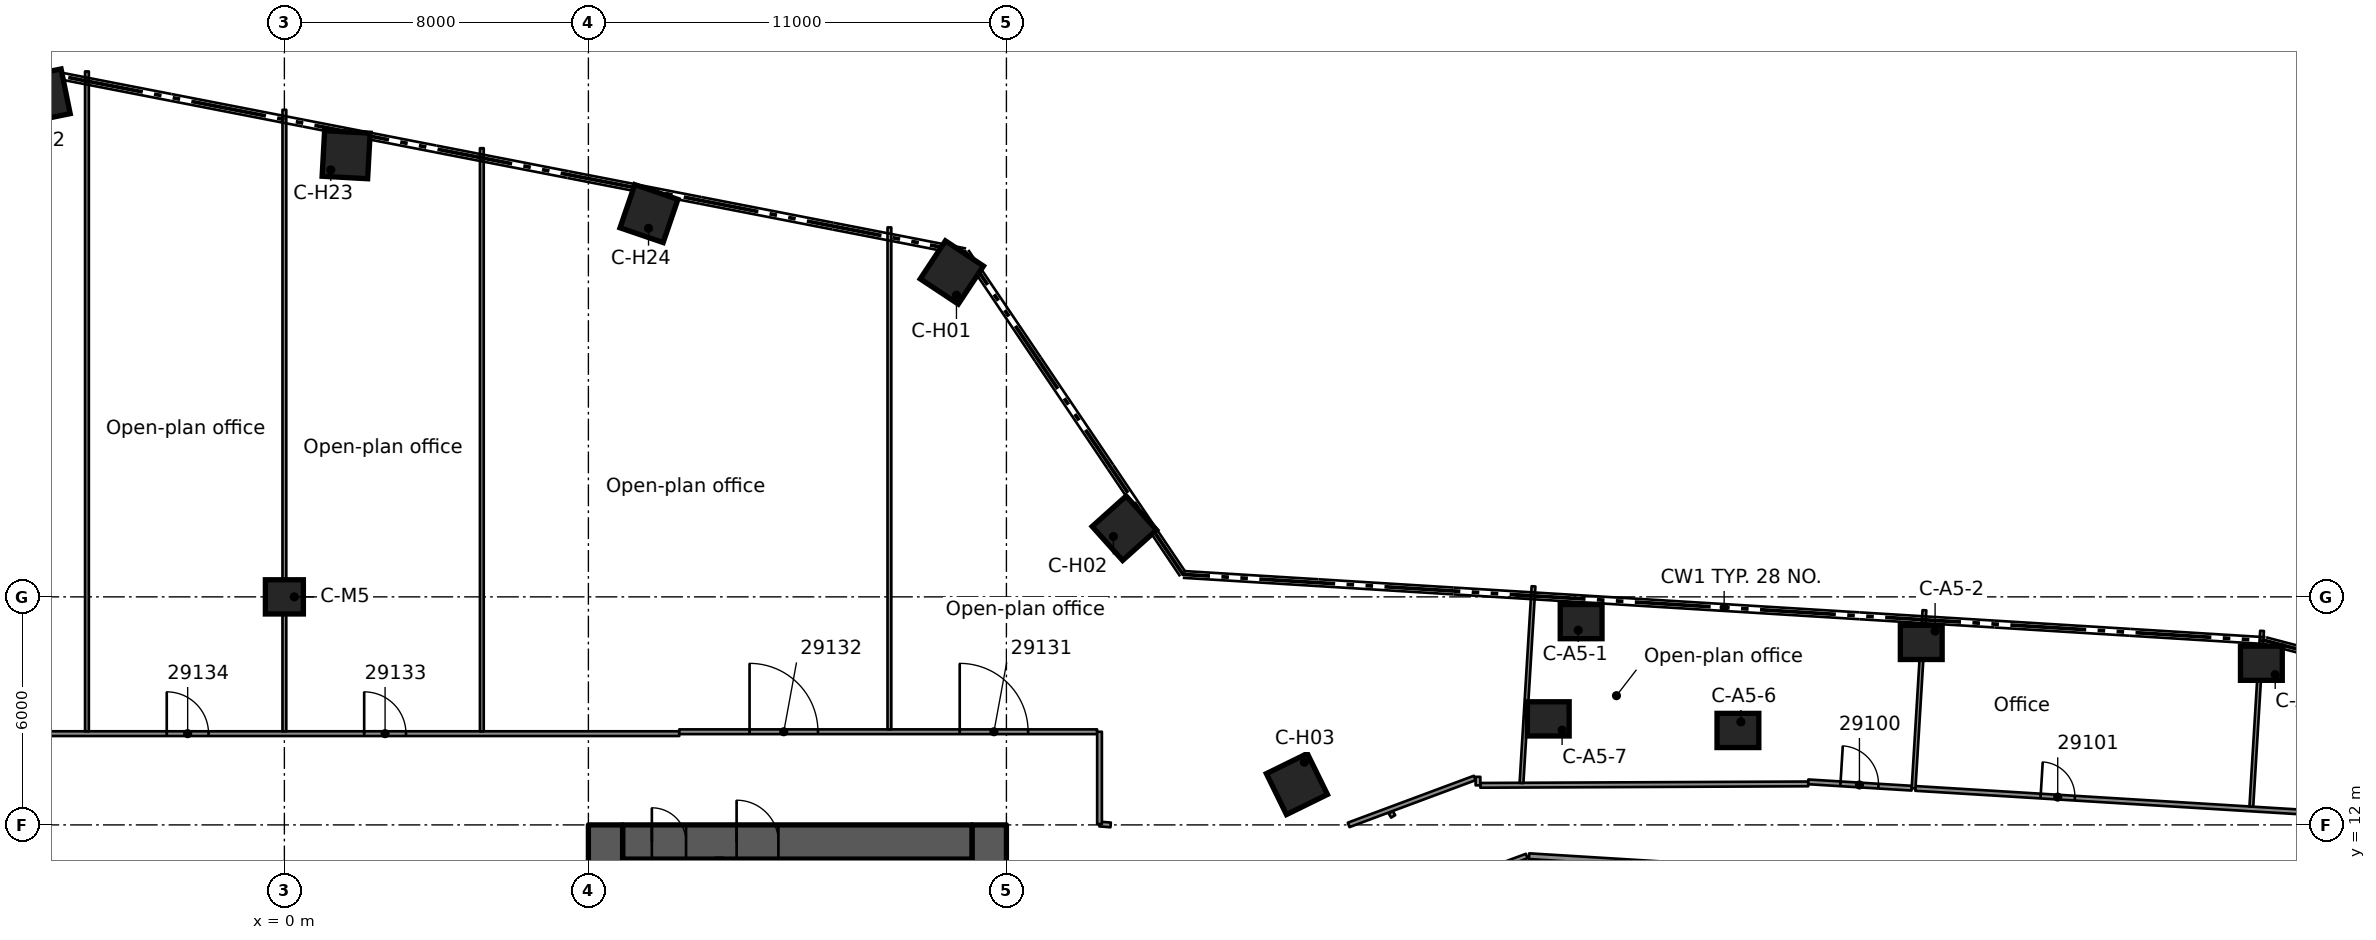
"""IFC4 building model, lengths in metres.
Left out: names, types, materials, properties, quantities, classifications, styles, units other than length and angle.
Written with IfcOpenShell. Run it as: python <this file> out.ifc"""

import sys

from ifc_helpers import new_model, si_unit, direction, frame, frame_2d, origin, origin_2d, place, context, subcontext, project, spatial, rectangle, extrude, element, fill, save


model = new_model("IFC4")
c1 = context("Model", 3, precision=1e-05, world=origin(), true_north=direction((0.0, 1.0)))
c2 = subcontext(c1, "Body", "Model", "MODEL_VIEW")
j1 = project(units=[si_unit("LENGTHUNIT", "METRE"), si_unit("PLANEANGLEUNIT", "RADIAN")], contexts=[c1])
p1 = place(None, origin())
s1 = spatial("IfcSite", under=j1, at=p1, CompositionType="ELEMENT")
p2 = place(p1, origin())
s2 = spatial("IfcBuilding", under=s1, at=p2, CompositionType="ELEMENT")
p3 = place(p2, frame((0.0, 0.0, 149.1)))
s3 = spatial("IfcBuildingStorey", under=s2, at=p3, CompositionType="ELEMENT", Elevation=149.1)
p4 = place(p3, frame((8.9, 11.55, 0.0), z_axis=(0.0, 0.0, 1.0), x_axis=(1.0, 0.0, 0.0)))
e1 = element("IfcWall", 1, at=p4, inside=s3, PredefinedType="SHEAR", context=c2, shape_type="SweptSolid", body=[
    extrude(rectangle(XDim=9.2, YDim=0.9, at=frame_2d((4.6, 0.0))), origin(), (0.0, 0.0, 1.0), 3.5),
])
p5 = place(p4, frame((3.0, 0.0, 0.0)))
e2 = element("IfcOpeningElement", 2, at=p5, cuts=e1, PredefinedType="OPENING", context=c2, shape_type="SweptSolid", body=[
    extrude(rectangle(XDim=1.1, YDim=2.1, at=frame_2d((0.55, 1.05))), frame((0.0, 0.46, 0.0), z_axis=(0.0, -1.0, 0.0), x_axis=(1.0, 0.0, 0.0)), (0.0, 0.0, 1.0), 0.92),
])
p6 = place(p4, frame((0.77, 0.0, 0.0)))
e3 = element("IfcOpeningElement", 3, at=p6, cuts=e1, PredefinedType="OPENING", context=c2, shape_type="SweptSolid", body=[
    extrude(rectangle(XDim=0.9, YDim=2.1, at=frame_2d((0.45, 1.05))), frame((0.0, 0.46, 0.0), z_axis=(0.0, -1.0, 0.0), x_axis=(1.0, 0.0, 0.0)), (0.0, 0.0, 1.0), 0.92),
])
p7 = place(p3, frame((8.45, -12.0, 0.0), z_axis=(0.0, 0.0, 1.0), x_axis=(0.0, 1.0, 0.0)))
e4 = element("IfcWall", 4, at=p7, inside=s3, PredefinedType="SHEAR", context=c2, shape_type="SweptSolid", body=[
    extrude(rectangle(XDim=24.0, YDim=0.9, at=frame_2d((12.0, 0.0))), origin(), (0.0, 0.0, 1.0), 3.5),
])
p8 = place(p7, frame((12.6, 0.0, 0.0)))
e5 = element("IfcOpeningElement", 5, at=p8, cuts=e4, PredefinedType="OPENING", context=c2, shape_type="SweptSolid", body=[
    extrude(rectangle(XDim=1.8, YDim=2.1, at=frame_2d((0.9, 1.05))), frame((0.0, 0.46, 0.0), z_axis=(0.0, -1.0, 0.0), x_axis=(1.0, 0.0, 0.0)), (0.0, 0.0, 1.0), 0.92),
])
p9 = place(p7, frame((3.25, 0.0, 0.0)))
e6 = element("IfcOpeningElement", 6, at=p9, cuts=e4, PredefinedType="OPENING", context=c2, shape_type="SweptSolid", body=[
    extrude(rectangle(XDim=1.1, YDim=2.1, at=frame_2d((0.55, 1.05))), frame((0.0, 0.46, 0.0), z_axis=(0.0, -1.0, 0.0), x_axis=(1.0, 0.0, 0.0)), (0.0, 0.0, 1.0), 0.92),
])
p10 = place(p3, frame((18.55, -12.0, 0.0), z_axis=(0.0, 0.0, 1.0), x_axis=(0.0, 1.0, 0.0)))
e7 = element("IfcWall", 7, at=p10, inside=s3, PredefinedType="SHEAR", context=c2, shape_type="SweptSolid", body=[
    extrude(rectangle(XDim=24.0, YDim=0.9, at=frame_2d((12.0, 0.0))), origin(), (0.0, 0.0, 1.0), 3.5),
])
p11 = place(p10, frame((12.1, 0.0, 0.0)))
e8 = element("IfcOpeningElement", 8, at=p11, cuts=e7, PredefinedType="OPENING", context=c2, shape_type="SweptSolid", body=[
    extrude(rectangle(XDim=1.8, YDim=2.1, at=frame_2d((0.9, 1.05))), frame((0.0, 0.46, 0.0), z_axis=(0.0, -1.0, 0.0), x_axis=(1.0, 0.0, 0.0)), (0.0, 0.0, 1.0), 0.92),
])
for number, where, z_axis, x_axis in (
    (9, (34.123, 17.349, 0.0), (0.0, 0.0, 1.0), (1.0, 0.0, 0.0)),
    (10, (43.073, 16.802, 0.0), (0.0, 0.0, 1.0), (1.0, 0.0, 0.0)),
    (11, (52.023, 16.254, 0.0), (0.0, 0.0, 1.0), (1.0, 0.0, 0.0)),
    (12, (38.249, 14.485, 0.0), (0.0, 0.0, 1.0), (1.0, 0.0, 0.0)),
    (13, (33.258, 14.79, 0.0), (0.0, 0.0, 1.0), (1.0, 0.0, 0.0)),
):
    element("IfcColumn", number, at=place(p3, frame(where, z_axis=z_axis, x_axis=x_axis)), inside=s3, PredefinedType="COLUMN", context=c2, shape_type="SweptSolid", body=[
        extrude(rectangle(XDim=1.1, YDim=0.9, at=origin_2d()), origin(), (0.0, 0.0, 1.0), 3.5),
    ])
for number, where, z_axis, x_axis in (
    (14, (17.564, 26.536, 0.0), (0.0, 0.0, 1.0), (0.552, 0.834, 0.0)),
    (15, (22.104, 19.806, 0.0), (0.0, 0.0, 1.0), (0.745, 0.667, 0.0)),
    (16, (26.644, 13.075, 0.0), (0.0, 0.0, 1.0), (0.898, 0.441, 0.0)),
    (17, (-6.344, 31.183, 0.0), (0.0, 0.0, 1.0), (-0.199, 0.98, 0.0)),
    (18, (1.625, 29.634, 0.0), (0.0, 0.0, 1.0), (0.055, 0.998, 0.0)),
    (19, (9.594, 28.085, 0.0), (0.0, 0.0, 1.0), (0.323, 0.946, 0.0)),
):
    element("IfcColumn", number, at=place(p3, frame(where, z_axis=z_axis, x_axis=x_axis)), inside=s3, PredefinedType="COLUMN", context=c2, shape_type="SweptSolid", body=[
        extrude(rectangle(XDim=1.2, YDim=1.2, at=origin_2d()), origin(), (0.0, 0.0, 1.0), 3.5),
    ])
p12 = place(p3, frame((0.0, 18.0, 0.0), z_axis=(0.0, 0.0, 1.0), x_axis=(1.0, 0.0, 0.0)))
e20 = element("IfcColumn", 20, at=p12, inside=s3, PredefinedType="COLUMN", context=c2, shape_type="SweptSolid", body=[
    extrude(rectangle(XDim=1.0, YDim=0.9, at=origin_2d()), origin(), (0.0, 0.0, 1.0), 3.5),
])
p13 = place(p3, frame((11.44, 11.1, 0.0), z_axis=(0.0, 0.0, 1.0), x_axis=(0.0, -1.0, 0.0)))
e21 = element("IfcWall", 21, at=p13, inside=s3, PredefinedType="SOLIDWALL", context=c2, shape_type="SweptSolid", body=[
    extrude(rectangle(XDim=4.125, YDim=0.2, at=frame_2d((2.062, 0.0))), origin(), (0.0, 0.0, 1.0), 3.09),
])
p14 = place(p3, frame((29.112, 12.332, 0.0), z_axis=(0.0, 0.0, 1.0), x_axis=(0.515635582666, -0.856807998264, 0.0)))
e22 = element("IfcWall", 22, at=p14, inside=s3, PredefinedType="PARTITIONING", context=c2, shape_type="SweptSolid", body=[
    extrude(rectangle(XDim=0.126, YDim=0.125, at=frame_2d((0.063, 0.0))), origin(), (0.0, 0.0, 1.0), 3.08),
])
p15 = place(p3, frame((21.45, 12.023, 0.0), z_axis=(0.0, 0.0, 1.0), x_axis=(0.996945992079, -0.078094102713, 0.0)))
e23 = element("IfcWall", 23, at=p15, inside=s3, PredefinedType="PARTITIONING", context=c2, shape_type="SweptSolid", body=[
    extrude(rectangle(XDim=0.294, YDim=0.125, at=frame_2d((0.147, 0.0))), origin(), (0.0, 0.0, 1.0), 3.08),
])
p16 = place(p3, frame((44.16, 10.478, 0.0), z_axis=(0.0, 0.0, 1.0), x_axis=(-0.998127894331, 0.061161315872, 0.0)))
e24 = element("IfcWall", 24, at=p16, inside=s3, PredefinedType="PARTITIONING", context=c2, shape_type="SweptSolid", body=[
    extrude(rectangle(XDim=11.428, YDim=0.15, at=frame_2d((5.714, 0.0))), origin(), (0.0, 0.0, 1.0), 3.08),
])
p17 = place(p16, frame((3.538, 0.0, 0.0)))
e25 = element("IfcOpeningElement", 25, at=p17, cuts=e24, PredefinedType="OPENING", context=c2, shape_type="SweptSolid", body=[
    extrude(rectangle(XDim=0.9, YDim=2.1, at=frame_2d((0.45, 1.05))), frame((0.0, 0.085, 0.0), z_axis=(0.0, -1.0, 0.0), x_axis=(1.0, 0.0, 0.0)), (0.0, 0.0, 1.0), 0.17),
])
p18 = place(p3, frame((42.921, 12.96, 0.0), z_axis=(0.0, 0.0, 1.0), x_axis=(0.998135679052, -0.061034139647, 0.0)))
e26 = element("IfcWall", 26, at=p18, inside=s3, PredefinedType="PARTITIONING", context=c2, shape_type="SweptSolid", body=[
    extrude(rectangle(XDim=13.468, YDim=0.125, at=frame_2d((6.734, 0.0))), origin(), (0.0, 0.0, 1.0), 3.08),
])
p19 = place(p18, frame((3.3, 0.0, 0.0)))
e27 = element("IfcOpeningElement", 27, at=p19, cuts=e26, PredefinedType="OPENING", context=c2, shape_type="SweptSolid", body=[
    extrude(rectangle(XDim=0.9, YDim=2.1, at=frame_2d((0.45, 1.05))), frame((0.0, 0.073, 0.0), z_axis=(0.0, -1.0, 0.0), x_axis=(1.0, 0.0, 0.0)), (0.0, 0.0, 1.0), 0.145),
])
p20 = place(p3, frame((40.099, 13.133, 0.0), z_axis=(0.0, 0.0, 1.0), x_axis=(0.998123336101, -0.061235658973, 0.0)))
e28 = element("IfcWall", 28, at=p20, inside=s3, PredefinedType="PARTITIONING", context=c2, shape_type="SweptSolid", body=[
    extrude(rectangle(XDim=2.727, YDim=0.125, at=frame_2d((1.364, 0.0))), origin(), (0.0, 0.0, 1.0), 3.08),
])
p21 = place(p20, frame((0.85, 0.0, 0.0)))
e29 = element("IfcOpeningElement", 29, at=p21, cuts=e28, PredefinedType="OPENING", context=c2, shape_type="SweptSolid", body=[
    extrude(rectangle(XDim=1.0, YDim=2.1, at=frame_2d((0.5, 1.05))), frame((0.0, 0.073, 0.0), z_axis=(0.0, -1.0, 0.0), x_axis=(1.0, 0.0, 0.0)), (0.0, 0.0, 1.0), 0.145),
])
p22 = place(p3, frame((31.471, 13.041, 0.0), z_axis=(0.0, 0.0, 1.0), x_axis=(0.999990255084, 0.004414718129, 0.0)))
e30 = element("IfcWall", 30, at=p22, inside=s3, PredefinedType="PARTITIONING", context=c2, shape_type="SweptSolid", body=[
    extrude(rectangle(XDim=8.627, YDim=0.125, at=frame_2d((4.313, 0.0))), origin(), (0.0, 0.0, 1.0), 3.08),
])
p23 = place(p3, frame((-10.39, 14.401, 0.0), z_axis=(0.0, 0.0, 1.0), x_axis=(1.0, 0.0, 0.0)))
e31 = element("IfcWall", 31, at=p23, inside=s3, PredefinedType="PARTITIONING", context=c2, shape_type="SweptSolid", body=[
    extrude(rectangle(XDim=20.781, YDim=0.125, at=frame_2d((10.391, 0.0))), origin(), (0.0, 0.0, 1.0), 3.08),
])
p24 = place(p23, frame((12.49, 0.0, 0.0)))
e32 = element("IfcOpeningElement", 32, at=p24, cuts=e31, PredefinedType="OPENING", context=c2, shape_type="SweptSolid", body=[
    extrude(rectangle(XDim=1.1, YDim=2.1, at=frame_2d((0.55, 1.05))), frame((0.0, 0.073, 0.0), z_axis=(0.0, -1.0, 0.0), x_axis=(1.0, 0.0, 0.0)), (0.0, 0.0, 1.0), 0.145),
])
p25 = place(p23, frame((7.295, 0.0, 0.0)))
e33 = element("IfcOpeningElement", 33, at=p25, cuts=e31, PredefinedType="OPENING", context=c2, shape_type="SweptSolid", body=[
    extrude(rectangle(XDim=1.1, YDim=2.1, at=frame_2d((0.55, 1.05))), frame((0.0, 0.073, 0.0), z_axis=(0.0, -1.0, 0.0), x_axis=(1.0, 0.0, 0.0)), (0.0, 0.0, 1.0), 0.145),
])
p26 = place(p3, frame((10.391, 14.451, 0.0), z_axis=(0.0, 0.0, 1.0), x_axis=(1.0, 0.0, 0.0)))
e34 = element("IfcWall", 34, at=p26, inside=s3, PredefinedType="PARTITIONING", context=c2, shape_type="SweptSolid", body=[
    extrude(rectangle(XDim=10.996, YDim=0.125, at=frame_2d((5.498, 0.0))), origin(), (0.0, 0.0, 1.0), 3.08),
])
p27 = place(p26, frame((7.38, 0.0, 0.0)))
e35 = element("IfcOpeningElement", 35, at=p27, cuts=e34, PredefinedType="OPENING", context=c2, shape_type="SweptSolid", body=[
    extrude(rectangle(XDim=1.8, YDim=2.1, at=frame_2d((0.9, 1.05))), frame((0.0, 0.073, 0.0), z_axis=(0.0, -1.0, 0.0), x_axis=(1.0, 0.0, 0.0)), (0.0, 0.0, 1.0), 0.145),
])
p28 = place(p26, frame((1.85, 0.0, 0.0)))
e36 = element("IfcOpeningElement", 36, at=p28, cuts=e34, PredefinedType="OPENING", context=c2, shape_type="SweptSolid", body=[
    extrude(rectangle(XDim=1.8, YDim=2.1, at=frame_2d((0.9, 1.05))), frame((0.0, 0.073, 0.0), z_axis=(0.0, -1.0, 0.0), x_axis=(1.0, 0.0, 0.0)), (0.0, 0.0, 1.0), 0.145),
])
p29 = place(p3, frame((25.787, 8.613, 0.0), z_axis=(0.0, 0.0, 1.0), x_axis=(0.937265679677, 0.348615899952, 0.0)))
e37 = element("IfcWall", 37, at=p29, inside=s3, PredefinedType="PARTITIONING", context=c2, shape_type="SweptSolid", body=[
    extrude(rectangle(XDim=7.366, YDim=0.125, at=frame_2d((3.683, 0.0))), origin(), (0.0, 0.0, 1.0), 3.08),
])
p30 = place(p3, frame((28.005, 12.0, 0.0), z_axis=(0.0, 0.0, 1.0), x_axis=(0.937179389565, 0.348847806034, 0.0)))
e38 = element("IfcWall", 38, at=p30, inside=s3, PredefinedType="PARTITIONING", context=c2, shape_type="SweptSolid", body=[
    extrude(rectangle(XDim=3.541, YDim=0.125, at=frame_2d((1.77, 0.0))), origin(), (0.0, 0.0, 1.0), 3.08),
])
p31 = place(p3, frame((51.759, 12.482, 0.0), z_axis=(0.0, 0.0, 1.0), x_axis=(0.060881783699, 0.998144983664, 0.0)))
e39 = element("IfcWall", 39, at=p31, inside=s3, PredefinedType="PARTITIONING", context=c2, shape_type="SweptSolid", body=[
    extrude(rectangle(XDim=4.632, YDim=0.1, at=frame_2d((2.316, 0.0))), origin(), (0.0, 0.0, 1.0), 3.08),
])
p32 = place(p3, frame((42.871, 12.963, 0.0), z_axis=(0.0, 0.0, 1.0), x_axis=(0.0609080718, 0.998143379876, 0.0)))
e40 = element("IfcWall", 40, at=p32, inside=s3, PredefinedType="PARTITIONING", context=c2, shape_type="SweptSolid", body=[
    extrude(rectangle(XDim=4.694, YDim=0.1, at=frame_2d((2.347, 0.0))), origin(), (0.0, 0.0, 1.0), 3.08),
])
p33 = place(p3, frame((32.554, 13.103, 0.0), z_axis=(0.0, 0.0, 1.0), x_axis=(0.060991322312, 0.998138296331, 0.0)))
e41 = element("IfcWall", 41, at=p33, inside=s3, PredefinedType="PARTITIONING", context=c2, shape_type="SweptSolid", body=[
    extrude(rectangle(XDim=5.184, YDim=0.1, at=frame_2d((2.592, 0.0))), origin(), (0.0, 0.0, 1.0), 3.08),
])
p34 = place(p3, frame((31.409, 13.041, 0.0), z_axis=(0.0, 0.0, 1.0), x_axis=(0.0, 1.0, 0.0)))
e42 = element("IfcWall", 42, at=p34, inside=s3, PredefinedType="PARTITIONING", context=c2, shape_type="SweptSolid", body=[
    extrude(rectangle(XDim=0.224, YDim=0.125, at=frame_2d((0.112, 0.0))), origin(), (0.0, 0.0, 1.0), 3.08),
])
p35 = place(p3, frame((21.45, 12.023, 0.0), z_axis=(0.0, 0.0, 1.0), x_axis=(0.0, 1.0, 0.0)))
e43 = element("IfcWall", 43, at=p35, inside=s3, PredefinedType="PARTITIONING", context=c2, shape_type="SweptSolid", body=[
    extrude(rectangle(XDim=2.428, YDim=0.125, at=frame_2d((1.214, 0.0))), origin(), (0.0, 0.0, 1.0), 3.08),
])
p36 = place(p3, frame((15.921, 14.514, 0.0), z_axis=(0.0, 0.0, 1.0), x_axis=(0.0, 1.0, 0.0)))
e44 = element("IfcWall", 44, at=p36, inside=s3, PredefinedType="PARTITIONING", context=c2, shape_type="SweptSolid", body=[
    extrude(rectangle(XDim=13.208, YDim=0.1, at=frame_2d((6.604, 0.0))), origin(), (0.0, 0.0, 1.0), 3.08),
])
p37 = place(p3, frame((5.196, 14.463, 0.0), z_axis=(0.0, 0.0, 1.0), x_axis=(0.0, 1.0, 0.0)))
e45 = element("IfcWall", 45, at=p37, inside=s3, PredefinedType="PARTITIONING", context=c2, shape_type="SweptSolid", body=[
    extrude(rectangle(XDim=15.343, YDim=0.1, at=frame_2d((7.671, 0.0))), origin(), (0.0, 0.0, 1.0), 3.08),
])
p38 = place(p3, frame((0.0, 14.463, 0.0), z_axis=(0.0, 0.0, 1.0), x_axis=(0.0, 1.0, 0.0)))
e46 = element("IfcWall", 46, at=p38, inside=s3, PredefinedType="PARTITIONING", context=c2, shape_type="SweptSolid", body=[
    extrude(rectangle(XDim=16.353, YDim=0.1, at=frame_2d((8.177, 0.0))), origin(), (0.0, 0.0, 1.0), 3.08),
])
p39 = place(p3, frame((-5.195, 14.463, 0.0), z_axis=(0.0, 0.0, 1.0), x_axis=(0.0, 1.0, 0.0)))
e47 = element("IfcWall", 47, at=p39, inside=s3, PredefinedType="PARTITIONING", context=c2, shape_type="SweptSolid", body=[
    extrude(rectangle(XDim=17.363, YDim=0.1, at=frame_2d((8.682, 0.0))), origin(), (0.0, 0.0, 1.0), 3.08),
])
p40 = place(p5, origin())
e48 = element("IfcDoor", 48, at=p40, inside=s3, OperationType="SINGLE_SWING_LEFT", PredefinedType="DOOR", context=c2, shape_type="SweptSolid", body=[
    extrude(rectangle(XDim=1.1, YDim=2.1, at=frame_2d((0.55, 1.05))), frame((0.0, 0.025, 0.0), z_axis=(0.0, -1.0, 0.0), x_axis=(1.0, 0.0, 0.0)), (0.0, 0.0, 1.0), 0.05),
])
fill(e2, e48)
p41 = place(p6, origin())
e49 = element("IfcDoor", 49, at=p41, inside=s3, OperationType="SINGLE_SWING_LEFT", PredefinedType="DOOR", context=c2, shape_type="SweptSolid", body=[
    extrude(rectangle(XDim=0.9, YDim=2.1, at=frame_2d((0.45, 1.05))), frame((0.0, 0.025, 0.0), z_axis=(0.0, -1.0, 0.0), x_axis=(1.0, 0.0, 0.0)), (0.0, 0.0, 1.0), 0.05),
])
fill(e3, e49)
p42 = place(p21, origin())
e50 = element("IfcDoor", 50, at=p42, inside=s3, OperationType="SINGLE_SWING_LEFT", PredefinedType="DOOR", context=c2, shape_type="SweptSolid", body=[
    extrude(rectangle(XDim=1.0, YDim=2.1, at=frame_2d((0.5, 1.05))), frame((0.0, 0.025, 0.0), z_axis=(0.0, -1.0, 0.0), x_axis=(1.0, 0.0, 0.0)), (0.0, 0.0, 1.0), 0.05),
])
fill(e29, e50)
p43 = place(p19, origin())
e51 = element("IfcDoor", 51, at=p43, inside=s3, OperationType="SINGLE_SWING_LEFT", PredefinedType="DOOR", context=c2, shape_type="SweptSolid", body=[
    extrude(rectangle(XDim=0.9, YDim=2.1, at=frame_2d((0.45, 1.05))), frame((0.0, 0.025, 0.0), z_axis=(0.0, -1.0, 0.0), x_axis=(1.0, 0.0, 0.0)), (0.0, 0.0, 1.0), 0.05),
])
fill(e27, e51)
p44 = place(p27, origin())
e52 = element("IfcDoor", 52, at=p44, inside=s3, OperationType="DOUBLE_DOOR_SINGLE_SWING", PredefinedType="DOOR", context=c2, shape_type="SweptSolid", body=[
    extrude(rectangle(XDim=1.8, YDim=2.1, at=frame_2d((0.9, 1.05))), frame((0.0, 0.025, 0.0), z_axis=(0.0, -1.0, 0.0), x_axis=(1.0, 0.0, 0.0)), (0.0, 0.0, 1.0), 0.05),
])
fill(e35, e52)
p45 = place(p28, origin())
e53 = element("IfcDoor", 53, at=p45, inside=s3, OperationType="DOUBLE_DOOR_SINGLE_SWING", PredefinedType="DOOR", context=c2, shape_type="SweptSolid", body=[
    extrude(rectangle(XDim=1.8, YDim=2.1, at=frame_2d((0.9, 1.05))), frame((0.0, 0.025, 0.0), z_axis=(0.0, -1.0, 0.0), x_axis=(1.0, 0.0, 0.0)), (0.0, 0.0, 1.0), 0.05),
])
fill(e36, e53)
p46 = place(p24, origin())
e54 = element("IfcDoor", 54, at=p46, inside=s3, OperationType="SINGLE_SWING_RIGHT", PredefinedType="DOOR", context=c2, shape_type="SweptSolid", body=[
    extrude(rectangle(XDim=1.1, YDim=2.1, at=frame_2d((0.55, 1.05))), frame((0.0, 0.025, 0.0), z_axis=(0.0, -1.0, 0.0), x_axis=(1.0, 0.0, 0.0)), (0.0, 0.0, 1.0), 0.05),
])
fill(e32, e54)
p47 = place(p25, origin())
e55 = element("IfcDoor", 55, at=p47, inside=s3, OperationType="SINGLE_SWING_LEFT", PredefinedType="DOOR", context=c2, shape_type="SweptSolid", body=[
    extrude(rectangle(XDim=1.1, YDim=2.1, at=frame_2d((0.55, 1.05))), frame((0.0, 0.025, 0.0), z_axis=(0.0, -1.0, 0.0), x_axis=(1.0, 0.0, 0.0)), (0.0, 0.0, 1.0), 0.05),
])
fill(e33, e55)
save(model, sys.argv[1])
